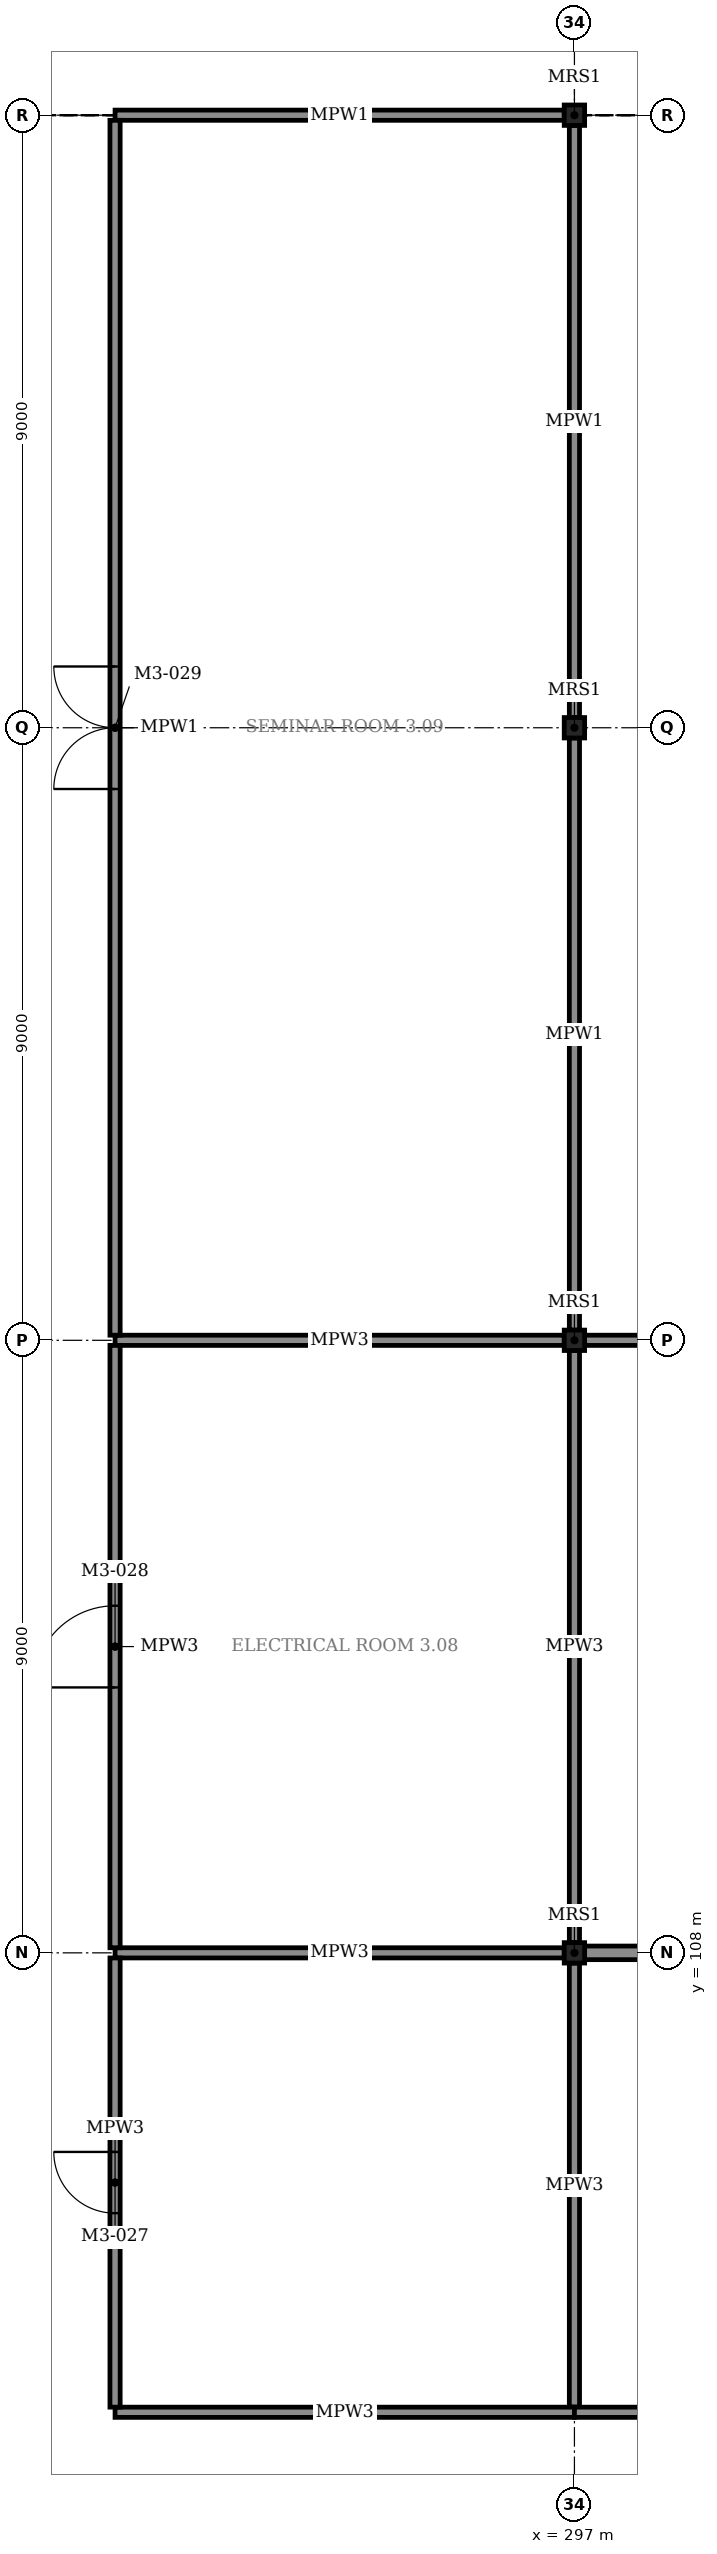
"""IFC4 building model, lengths in metres.
Left out: names, types, materials, properties, quantities, classifications, styles, units other than length and angle.
Written with IfcOpenShell. Run it as: python <this file> out.ifc"""

import sys

from ifc_helpers import new_model, si_unit, direction, frame, frame_2d, origin, origin_2d, place, context, subcontext, project, spatial, rectangle, hollow_rectangle, extrude, element, fill, save


model = new_model("IFC4")
c1 = context("Model", 3, precision=1e-05, world=origin(), true_north=direction((0.0, 1.0)))
c2 = subcontext(c1, "Body", "Model", "MODEL_VIEW")
j1 = project(units=[si_unit("LENGTHUNIT", "METRE"), si_unit("PLANEANGLEUNIT", "RADIAN")], contexts=[c1])
p1 = place(None, origin())
s1 = spatial("IfcSite", under=j1, at=p1, CompositionType="ELEMENT")
p2 = place(p1, origin())
s2 = spatial("IfcBuilding", under=s1, at=p2, CompositionType="ELEMENT")
p3 = place(p2, frame((0.0, 0.0, 17.0)))
s3 = spatial("IfcBuildingStorey", under=s2, at=p3, CompositionType="ELEMENT", Elevation=17.0)
for number, where, z_axis, x_axis in (
    (1, (297.0, 108.0, 0.0), (0.0, 0.0, 1.0), (1.0, 0.0, 0.0)),
    (2, (297.0, 117.0, 0.0), (0.0, 0.0, 1.0), (1.0, 0.0, 0.0)),
    (3, (297.0, 126.0, 0.0), (0.0, 0.0, 1.0), (1.0, 0.0, 0.0)),
    (4, (297.0, 135.0, 0.0), (0.0, 0.0, 1.0), (1.0, 0.0, 0.0)),
):
    element("IfcColumn", number, at=place(p3, frame(where, z_axis=z_axis, x_axis=x_axis)), inside=s3, PredefinedType="COLUMN", context=c2, shape_type="SweptSolid", body=[
        extrude(hollow_rectangle(XDim=0.3, YDim=0.3, WallThickness=0.012, InnerFilletRadius=0.024, OuterFilletRadius=0.036, at=origin_2d()), origin(), (0.0, 0.0, 1.0), 3.1),
    ])
p4 = place(p3, frame((290.25, 101.25, 0.0), z_axis=(0.0, 0.0, 1.0), x_axis=(1.0, 0.0, 0.0)))
e5 = element("IfcWall", 5, at=p4, inside=s3, PredefinedType="PARTITIONING", context=c2, shape_type="SweptSolid", body=[
    extrude(rectangle(XDim=6.75, YDim=0.15, at=frame_2d((3.375, 0.0))), origin(), (0.0, 0.0, 1.0), 3.0),
])
p5 = place(p3, frame((290.25, 108.0, 0.0), z_axis=(0.0, 0.0, 1.0), x_axis=(1.0, 0.0, 0.0)))
e6 = element("IfcWall", 6, at=p5, inside=s3, PredefinedType="PARTITIONING", context=c2, shape_type="SweptSolid", body=[
    extrude(rectangle(XDim=6.6, YDim=0.15, at=frame_2d((3.3, 0.0))), origin(), (0.0, 0.0, 1.0), 3.0),
])
p6 = place(p3, frame((290.25, 101.325, 0.0), z_axis=(0.0, 0.0, 1.0), x_axis=(0.0, 1.0, 0.0)))
e7 = element("IfcWall", 7, at=p6, inside=s3, PredefinedType="PARTITIONING", context=c2, shape_type="SweptSolid", body=[
    extrude(rectangle(XDim=6.6, YDim=0.15, at=frame_2d((3.3, 0.0))), origin(), (0.0, 0.0, 1.0), 3.0),
])
p7 = place(p6, frame((2.85, 0.0, 0.0)))
e8 = element("IfcOpeningElement", 8, at=p7, cuts=e7, PredefinedType="OPENING", context=c2, shape_type="SweptSolid", body=[
    extrude(rectangle(XDim=0.9, YDim=2.1, at=frame_2d((0.45, 1.05))), frame((0.0, 0.085, 0.0), z_axis=(0.0, -1.0, 0.0), x_axis=(1.0, 0.0, 0.0)), (0.0, 0.0, 1.0), 0.17),
])
p8 = place(p3, frame((297.0, 101.325, 0.0), z_axis=(0.0, 0.0, 1.0), x_axis=(0.0, 1.0, 0.0)))
e9 = element("IfcWall", 9, at=p8, inside=s3, PredefinedType="PARTITIONING", context=c2, shape_type="SweptSolid", body=[
    extrude(rectangle(XDim=6.525, YDim=0.15, at=frame_2d((3.263, 0.0))), origin(), (0.0, 0.0, 1.0), 3.0),
])
p9 = place(p3, frame((290.25, 117.0, 0.0), z_axis=(0.0, 0.0, 1.0), x_axis=(1.0, 0.0, 0.0)))
e10 = element("IfcWall", 10, at=p9, inside=s3, PredefinedType="PARTITIONING", context=c2, shape_type="SweptSolid", body=[
    extrude(rectangle(XDim=6.6, YDim=0.15, at=frame_2d((3.3, 0.0))), origin(), (0.0, 0.0, 1.0), 3.0),
])
p10 = place(p3, frame((290.25, 108.075, 0.0), z_axis=(0.0, 0.0, 1.0), x_axis=(0.0, 1.0, 0.0)))
e11 = element("IfcWall", 11, at=p10, inside=s3, PredefinedType="PARTITIONING", context=c2, shape_type="SweptSolid", body=[
    extrude(rectangle(XDim=8.85, YDim=0.15, at=frame_2d((4.425, 0.0))), origin(), (0.0, 0.0, 1.0), 3.0),
])
p11 = place(p10, frame((3.825, 0.0, 0.0)))
e12 = element("IfcOpeningElement", 12, at=p11, cuts=e11, PredefinedType="OPENING", context=c2, shape_type="SweptSolid", body=[
    extrude(rectangle(XDim=1.2, YDim=2.4, at=frame_2d((0.6, 1.2))), frame((0.0, 0.085, 0.0), z_axis=(0.0, -1.0, 0.0), x_axis=(1.0, 0.0, 0.0)), (0.0, 0.0, 1.0), 0.17),
])
p12 = place(p3, frame((297.0, 108.15, 0.0), z_axis=(0.0, 0.0, 1.0), x_axis=(0.0, 1.0, 0.0)))
e13 = element("IfcWall", 13, at=p12, inside=s3, PredefinedType="PARTITIONING", context=c2, shape_type="SweptSolid", body=[
    extrude(rectangle(XDim=8.7, YDim=0.15, at=frame_2d((4.35, 0.0))), origin(), (0.0, 0.0, 1.0), 3.0),
])
p13 = place(p3, frame((290.25, 135.0, 0.0), z_axis=(0.0, 0.0, 1.0), x_axis=(1.0, 0.0, 0.0)))
e14 = element("IfcWall", 14, at=p13, inside=s3, PredefinedType="PARTITIONING", context=c2, shape_type="SweptSolid", body=[
    extrude(rectangle(XDim=6.6, YDim=0.15, at=frame_2d((3.3, 0.0))), origin(), (0.0, 0.0, 1.0), 3.0),
])
p14 = place(p3, frame((290.25, 117.075, 0.0), z_axis=(0.0, 0.0, 1.0), x_axis=(0.0, 1.0, 0.0)))
e15 = element("IfcWall", 15, at=p14, inside=s3, PredefinedType="PARTITIONING", context=c2, shape_type="SweptSolid", body=[
    extrude(rectangle(XDim=17.85, YDim=0.15, at=frame_2d((8.925, 0.0))), origin(), (0.0, 0.0, 1.0), 3.0),
])
p15 = place(p14, frame((8.025, 0.0, 0.0)))
e16 = element("IfcOpeningElement", 16, at=p15, cuts=e15, PredefinedType="OPENING", context=c2, shape_type="SweptSolid", body=[
    extrude(rectangle(XDim=1.8, YDim=2.4, at=frame_2d((0.9, 1.2))), frame((0.0, 0.085, 0.0), z_axis=(0.0, -1.0, 0.0), x_axis=(1.0, 0.0, 0.0)), (0.0, 0.0, 1.0), 0.17),
])
for number, where, z_axis, x_axis in (
    (17, (297.0, 117.15, 0.0), (0.0, 0.0, 1.0), (0.0, 1.0, 0.0)),
    (18, (297.0, 126.15, 0.0), (0.0, 0.0, 1.0), (0.0, 1.0, 0.0)),
):
    element("IfcWall", number, at=place(p3, frame(where, z_axis=z_axis, x_axis=x_axis)), inside=s3, PredefinedType="PARTITIONING", context=c2, shape_type="SweptSolid", body=[
        extrude(rectangle(XDim=8.7, YDim=0.15, at=frame_2d((4.35, 0.0))), origin(), (0.0, 0.0, 1.0), 3.0),
    ])
p16 = place(p3, frame((297.0, 101.25, 0.0), z_axis=(0.0, 0.0, 1.0), x_axis=(1.0, 0.0, 0.0)))
e19 = element("IfcWall", 19, at=p16, inside=s3, PredefinedType="PARTITIONING", context=c2, shape_type="SweptSolid", body=[
    extrude(rectangle(XDim=9.0, YDim=0.15, at=frame_2d((4.5, 0.0))), origin(), (0.0, 0.0, 1.0), 3.0),
])
p17 = place(p16, frame((4.0, 0.0, 0.0)))
e20 = element("IfcOpeningElement", 20, at=p17, cuts=e19, PredefinedType="OPENING", context=c2, shape_type="SweptSolid", body=[
    extrude(rectangle(XDim=1.0, YDim=2.4, at=frame_2d((0.5, 1.2))), frame((0.0, 0.085, 0.0), z_axis=(0.0, -1.0, 0.0), x_axis=(1.0, 0.0, 0.0)), (0.0, 0.0, 1.0), 0.17),
])
p18 = place(p3, frame((297.15, 108.0, 0.0), z_axis=(0.0, 0.0, 1.0), x_axis=(1.0, 0.0, 0.0)))
e21 = element("IfcWall", 21, at=p18, inside=s3, PredefinedType="PARTITIONING", context=c2, shape_type="SweptSolid", body=[
    extrude(rectangle(XDim=8.7, YDim=0.2, at=frame_2d((4.35, 0.0))), origin(), (0.0, 0.0, 1.0), 3.0),
])
p19 = place(p3, frame((297.15, 117.0, 0.0), z_axis=(0.0, 0.0, 1.0), x_axis=(1.0, 0.0, 0.0)))
e22 = element("IfcWall", 22, at=p19, inside=s3, PredefinedType="PARTITIONING", context=c2, shape_type="SweptSolid", body=[
    extrude(rectangle(XDim=8.7, YDim=0.15, at=frame_2d((4.35, 0.0))), origin(), (0.0, 0.0, 1.0), 3.0),
])
p20 = place(p19, frame((3.45, 0.0, 0.0)))
e23 = element("IfcOpeningElement", 23, at=p20, cuts=e22, PredefinedType="OPENING", context=c2, shape_type="SweptSolid", body=[
    extrude(rectangle(XDim=1.8, YDim=2.4, at=frame_2d((0.9, 1.2))), frame((0.0, 0.085, 0.0), z_axis=(0.0, -1.0, 0.0), x_axis=(1.0, 0.0, 0.0)), (0.0, 0.0, 1.0), 0.17),
])
p21 = place(p7, origin())
e24 = element("IfcDoor", 24, at=p21, inside=s3, OperationType="SINGLE_SWING_RIGHT", PredefinedType="DOOR", context=c2, shape_type="SweptSolid", body=[
    extrude(rectangle(XDim=0.9, YDim=2.1, at=frame_2d((0.45, 1.05))), frame((0.0, 0.025, 0.0), z_axis=(0.0, -1.0, 0.0), x_axis=(1.0, 0.0, 0.0)), (0.0, 0.0, 1.0), 0.05),
])
fill(e8, e24)
p22 = place(p11, origin())
e25 = element("IfcDoor", 25, at=p22, inside=s3, OperationType="SINGLE_SWING_LEFT", PredefinedType="DOOR", context=c2, shape_type="SweptSolid", body=[
    extrude(rectangle(XDim=1.2, YDim=2.4, at=frame_2d((0.6, 1.2))), frame((0.0, 0.025, 0.0), z_axis=(0.0, -1.0, 0.0), x_axis=(1.0, 0.0, 0.0)), (0.0, 0.0, 1.0), 0.05),
])
fill(e12, e25)
p23 = place(p15, origin())
e26 = element("IfcDoor", 26, at=p23, inside=s3, OperationType="DOUBLE_DOOR_SINGLE_SWING", PredefinedType="DOOR", context=c2, shape_type="SweptSolid", body=[
    extrude(rectangle(XDim=1.8, YDim=2.4, at=frame_2d((0.9, 1.2))), frame((0.0, 0.025, 0.0), z_axis=(0.0, -1.0, 0.0), x_axis=(1.0, 0.0, 0.0)), (0.0, 0.0, 1.0), 0.05),
])
fill(e16, e26)
save(model, sys.argv[1])
